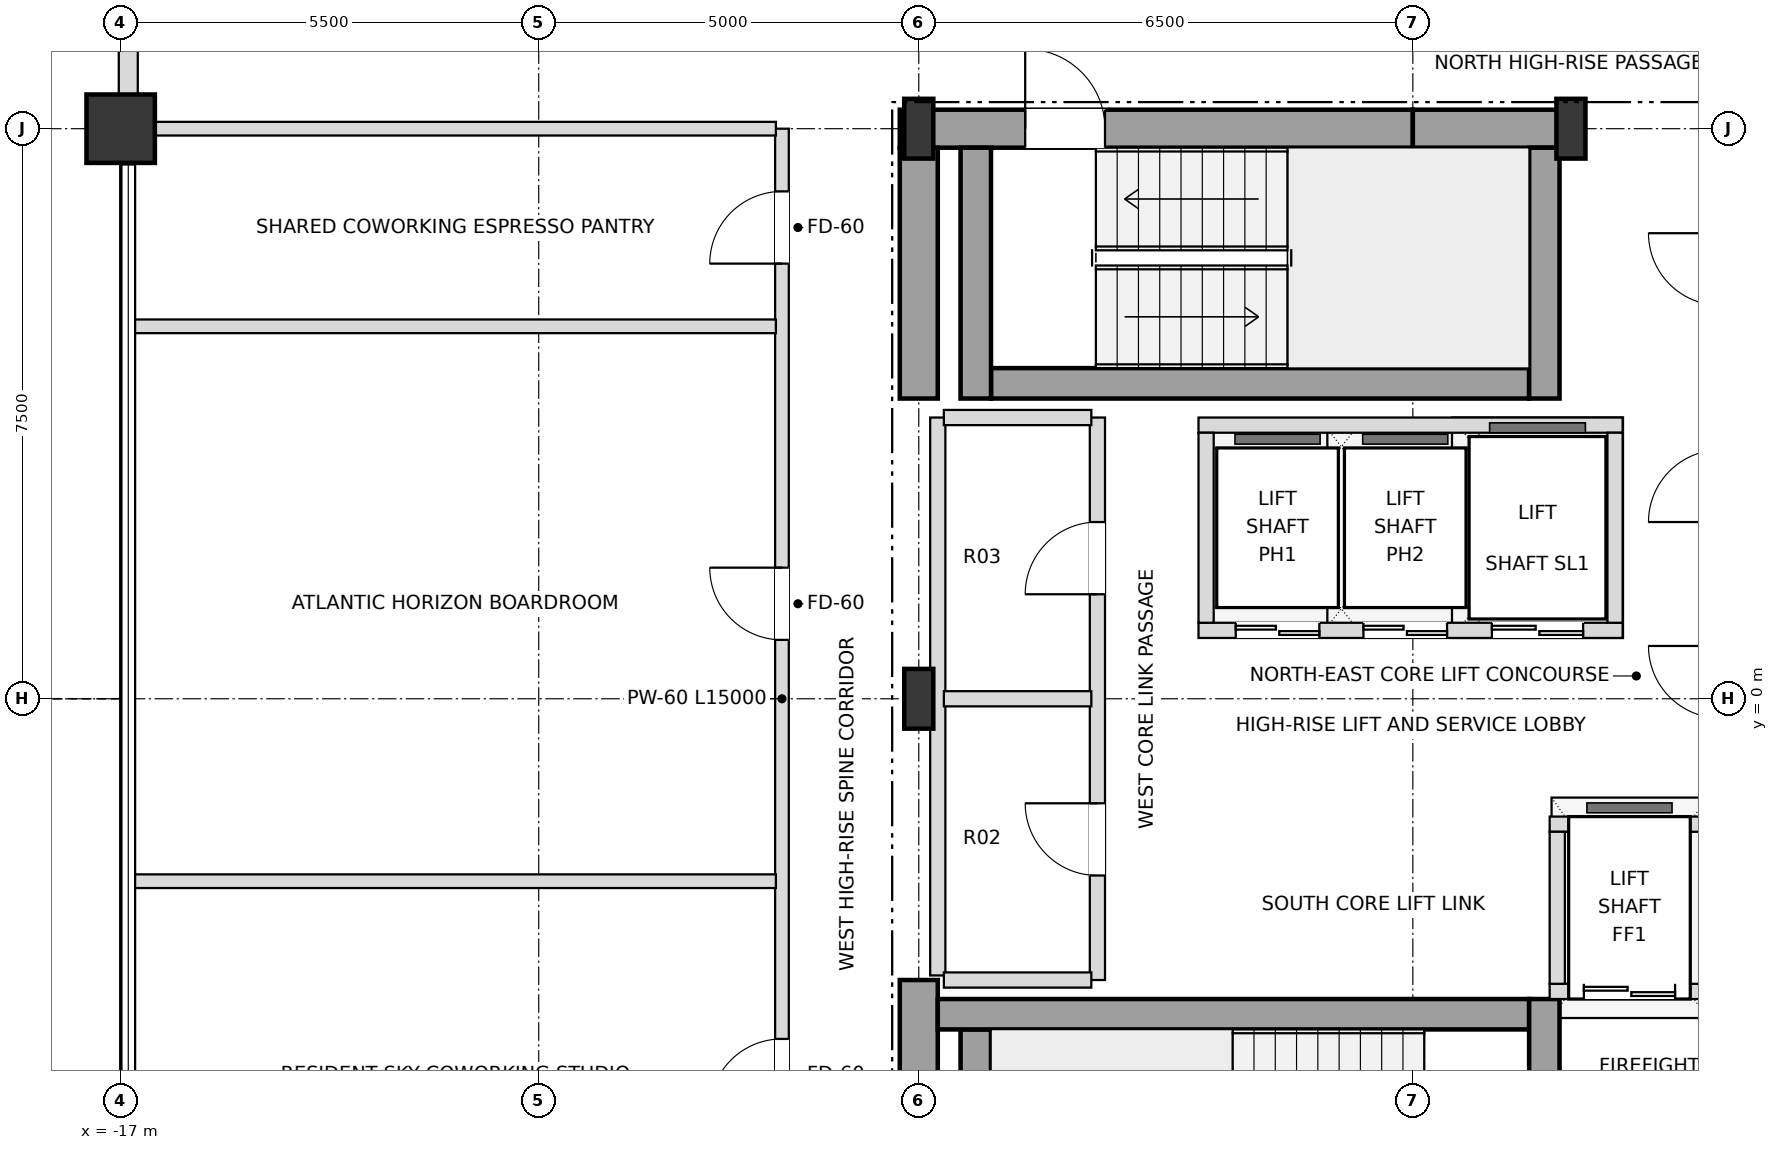
"""IFC4 building model, lengths in metres.
Left out: names, types, materials, properties, quantities, classifications, styles, units other than length and angle.
Written with IfcOpenShell. Run it as: python <this file> out.ifc"""

import sys

from ifc_helpers import new_model, si_unit, direction, frame, frame_2d, origin, origin_2d, place, context, subcontext, project, spatial, rectangle, i_section, extrude, element, fill, save


model = new_model("IFC4")
c1 = context("Model", 3, precision=1e-05, world=origin(), true_north=direction((0.0, 1.0)))
c2 = subcontext(c1, "Body", "Model", "MODEL_VIEW")
j1 = project(units=[si_unit("LENGTHUNIT", "METRE"), si_unit("PLANEANGLEUNIT", "RADIAN")], contexts=[c1])
p1 = place(None, origin())
s1 = spatial("IfcSite", under=j1, at=p1, CompositionType="ELEMENT")
p2 = place(p1, origin())
s2 = spatial("IfcBuilding", under=s1, at=p2, CompositionType="ELEMENT")
p3 = place(p2, frame((0.0, 0.0, 272.7)))
s3 = spatial("IfcBuildingStorey", under=s2, at=p3, CompositionType="ELEMENT", Elevation=272.7)
for number, where, z_axis, x_axis in (
    (1, (-6.5, 0.0, 0.0), (0.0, 0.0, 1.0), (1.0, 0.0, 0.0)),
    (2, (-6.5, 7.5, 0.0), (0.0, 0.0, 1.0), (1.0, 0.0, 0.0)),
    (3, (2.08, 7.5, 0.0), (0.0, 0.0, 1.0), (1.0, 0.0, 0.0)),
):
    element("IfcColumn", number, at=place(p3, frame(where, z_axis=z_axis, x_axis=x_axis)), inside=s3, PredefinedType="COLUMN", context=c2, shape_type="SweptSolid", body=[
        extrude(i_section(OverallWidth=0.382, OverallDepth=0.786, WebThickness=0.02, FlangeThickness=0.033, at=origin_2d()), origin(), (0.0, 0.0, 1.0), 3.6),
    ])
p4 = place(p3, frame((-17.0, 7.5, 0.0), z_axis=(0.0, 0.0, 1.0), x_axis=(1.0, 0.0, 0.0)))
e4 = element("IfcColumn", 4, at=p4, inside=s3, PredefinedType="USERDEFINED", context=c2, shape_type="SweptSolid", body=[
    extrude(rectangle(XDim=0.9, YDim=0.9, at=origin_2d()), origin(), (0.0, 0.0, 1.0), 3.6),
])
p5 = place(p3, frame((-16.9, 12.555, 0.0), z_axis=(0.0, 0.0, 1.0), x_axis=(0.0, -1.0, 0.0)))
e5 = element("IfcWall", 5, at=p5, inside=s3, PredefinedType="SOLIDWALL", context=c2, shape_type="SweptSolid", body=[
    extrude(rectangle(XDim=4.61, YDim=0.25, at=frame_2d((2.305, 0.0))), origin(), (0.0, 0.0, 1.0), 2.748),
])
p6 = place(p5, frame((1.405, 0.0, 0.72)))
e6 = element("IfcOpeningElement", 6, at=p6, cuts=e5, PredefinedType="OPENING", context=c2, shape_type="SweptSolid", body=[
    extrude(rectangle(XDim=1.8, YDim=1.68, at=frame_2d((0.9, 0.84))), frame((0.0, 0.135, 0.0), z_axis=(0.0, -1.0, 0.0), x_axis=(1.0, 0.0, 0.0)), (0.0, 0.0, 1.0), 0.27),
])
p7 = place(p3, frame((-6.75, 7.5, 0.0), z_axis=(0.0, 0.0, 1.0), x_axis=(1.0, 0.0, 0.0)))
e7 = element("IfcWall", 7, at=p7, inside=s3, PredefinedType="SHEAR", context=c2, shape_type="SweptSolid", body=[
    extrude(rectangle(XDim=6.75, YDim=0.5, at=frame_2d((3.375, 0.0))), origin(), (0.0, 0.0, 1.0), 3.38),
])
p8 = place(p7, frame((1.65, 0.0, 0.0)))
e8 = element("IfcOpeningElement", 8, at=p8, cuts=e7, PredefinedType="OPENING", context=c2, shape_type="SweptSolid", body=[
    extrude(rectangle(XDim=1.05, YDim=2.15, at=frame_2d((0.525, 1.075))), frame((0.0, 0.26, 0.0), z_axis=(0.0, -1.0, 0.0), x_axis=(1.0, 0.0, 0.0)), (0.0, 0.0, 1.0), 0.52),
])
p9 = place(p3, frame((0.0, 7.5, 0.0), z_axis=(0.0, 0.0, 1.0), x_axis=(1.0, 0.0, 0.0)))
e9 = element("IfcWall", 9, at=p9, inside=s3, PredefinedType="SHEAR", context=c2, shape_type="SweptSolid", body=[
    extrude(rectangle(XDim=2.08, YDim=0.5, at=frame_2d((1.04, 0.0))), origin(), (0.0, 0.0, 1.0), 3.38),
])
p10 = place(p3, frame((-6.5, -7.25, 0.0), z_axis=(0.0, 0.0, 1.0), x_axis=(0.0, 1.0, 0.0)))
e10 = element("IfcWall", 10, at=p10, inside=s3, PredefinedType="SHEAR", context=c2, shape_type="SweptSolid", body=[
    extrude(rectangle(XDim=3.55, YDim=0.5, at=frame_2d((1.775, 0.0))), origin(), (0.0, 0.0, 1.0), 3.38),
])
p11 = place(p3, frame((-6.5, 3.95, 0.0), z_axis=(0.0, 0.0, 1.0), x_axis=(0.0, 1.0, 0.0)))
e11 = element("IfcWall", 11, at=p11, inside=s3, PredefinedType="SHEAR", context=c2, shape_type="SweptSolid", body=[
    extrude(rectangle(XDim=3.3, YDim=0.5, at=frame_2d((1.65, 0.0))), origin(), (0.0, 0.0, 1.0), 3.38),
])
p12 = place(p3, frame((-5.75, -7.25, 0.0), z_axis=(0.0, 0.0, 1.0), x_axis=(0.0, 1.0, 0.0)))
e12 = element("IfcWall", 12, at=p12, inside=s3, PredefinedType="SHEAR", context=c2, shape_type="SweptSolid", body=[
    extrude(rectangle(XDim=2.9, YDim=0.4, at=frame_2d((1.45, 0.0))), origin(), (0.0, 0.0, 1.0), 3.38),
])
p13 = place(p3, frame((-6.25, -4.15, 0.0), z_axis=(0.0, 0.0, 1.0), x_axis=(1.0, 0.0, 0.0)))
e13 = element("IfcWall", 13, at=p13, inside=s3, PredefinedType="SHEAR", context=c2, shape_type="SweptSolid", body=[
    extrude(rectangle(XDim=7.78, YDim=0.4, at=frame_2d((3.89, 0.0))), origin(), (0.0, 0.0, 1.0), 3.38),
])
p14 = place(p3, frame((1.73, -7.25, 0.0), z_axis=(0.0, 0.0, 1.0), x_axis=(0.0, 1.0, 0.0)))
e14 = element("IfcWall", 14, at=p14, inside=s3, PredefinedType="SHEAR", context=c2, shape_type="SweptSolid", body=[
    extrude(rectangle(XDim=3.3, YDim=0.4, at=frame_2d((1.65, 0.0))), origin(), (0.0, 0.0, 1.0), 3.38),
])
p15 = place(p14, frame((0.9, 0.0, 0.0)))
e15 = element("IfcOpeningElement", 15, at=p15, cuts=e14, PredefinedType="OPENING", context=c2, shape_type="SweptSolid", body=[
    extrude(rectangle(XDim=1.05, YDim=2.15, at=frame_2d((0.525, 1.075))), frame((0.0, 0.21, 0.0), z_axis=(0.0, -1.0, 0.0), x_axis=(1.0, 0.0, 0.0)), (0.0, 0.0, 1.0), 0.42),
])
p16 = place(p3, frame((-5.55, 4.15, 0.0), z_axis=(0.0, 0.0, 1.0), x_axis=(1.0, 0.0, 0.0)))
e16 = element("IfcWall", 16, at=p16, inside=s3, PredefinedType="SHEAR", context=c2, shape_type="SweptSolid", body=[
    extrude(rectangle(XDim=7.08, YDim=0.4, at=frame_2d((3.54, 0.0))), origin(), (0.0, 0.0, 1.0), 3.38),
])
for number, where, z_axis, x_axis in (
    (17, (1.73, 3.95, 0.0), (0.0, 0.0, 1.0), (0.0, 1.0, 0.0)),
    (18, (-5.75, 3.95, 0.0), (0.0, 0.0, 1.0), (0.0, 1.0, 0.0)),
):
    element("IfcWall", number, at=place(p3, frame(where, z_axis=z_axis, x_axis=x_axis)), inside=s3, PredefinedType="SHEAR", context=c2, shape_type="SweptSolid", body=[
        extrude(rectangle(XDim=3.3, YDim=0.4, at=frame_2d((1.65, 0.0))), origin(), (0.0, 0.0, 1.0), 3.38),
    ])
p17 = place(p3, frame((-2.82, 0.9, 0.0), z_axis=(0.0, 0.0, 1.0), x_axis=(1.0, 0.0, 0.0)))
e19 = element("IfcWall", 19, at=p17, inside=s3, PredefinedType="SOLIDWALL", context=c2, shape_type="SweptSolid", body=[
    extrude(rectangle(XDim=5.58, YDim=0.2, at=frame_2d((2.79, 0.0))), origin(), (0.0, 0.0, 1.0), 3.38),
])
p18 = place(p17, frame((0.49, 0.0, 0.0)))
e20 = element("IfcOpeningElement", 20, at=p18, cuts=e19, PredefinedType="OPENING", context=c2, shape_type="SweptSolid", body=[
    extrude(rectangle(XDim=1.1, YDim=2.15, at=frame_2d((0.55, 1.075))), frame((0.0, 0.11, 0.0), z_axis=(0.0, -1.0, 0.0), x_axis=(1.0, 0.0, 0.0)), (0.0, 0.0, 1.0), 0.22),
])
p19 = place(p17, frame((2.17, 0.0, 0.0)))
e21 = element("IfcOpeningElement", 21, at=p19, cuts=e19, PredefinedType="OPENING", context=c2, shape_type="SweptSolid", body=[
    extrude(rectangle(XDim=1.1, YDim=2.15, at=frame_2d((0.55, 1.075))), frame((0.0, 0.11, 0.0), z_axis=(0.0, -1.0, 0.0), x_axis=(1.0, 0.0, 0.0)), (0.0, 0.0, 1.0), 0.22),
])
p20 = place(p17, frame((3.86, 0.0, 0.0)))
e22 = element("IfcOpeningElement", 22, at=p20, cuts=e19, PredefinedType="OPENING", context=c2, shape_type="SweptSolid", body=[
    extrude(rectangle(XDim=1.2, YDim=2.2, at=frame_2d((0.6, 1.1))), frame((0.0, 0.11, 0.0), z_axis=(0.0, -1.0, 0.0), x_axis=(1.0, 0.0, 0.0)), (0.0, 0.0, 1.0), 0.22),
])
p21 = place(p3, frame((-2.82, 3.6, 0.0), z_axis=(0.0, 0.0, 1.0), x_axis=(1.0, 0.0, 0.0)))
e23 = element("IfcWall", 23, at=p21, inside=s3, PredefinedType="SOLIDWALL", context=c2, shape_type="SweptSolid", body=[
    extrude(rectangle(XDim=5.58, YDim=0.2, at=frame_2d((2.79, 0.0))), origin(), (0.0, 0.0, 1.0), 3.38),
])
for number, where, z_axis, x_axis in (
    (24, (-2.72, 1.0, 0.0), (0.0, 0.0, 1.0), (0.0, 1.0, 0.0)),
    (25, (2.66, 1.0, 0.0), (0.0, 0.0, 1.0), (0.0, 1.0, 0.0)),
):
    element("IfcWall", number, at=place(p3, frame(where, z_axis=z_axis, x_axis=x_axis)), inside=s3, PredefinedType="SOLIDWALL", context=c2, shape_type="SweptSolid", body=[
        extrude(rectangle(XDim=2.5, YDim=0.2, at=frame_2d((1.25, 0.0))), origin(), (0.0, 0.0, 1.0), 3.38),
    ])
p22 = place(p3, frame((1.8, -3.85, 0.0), z_axis=(0.0, 0.0, 1.0), x_axis=(1.0, 0.0, 0.0)))
e26 = element("IfcWall", 26, at=p22, inside=s3, PredefinedType="SOLIDWALL", context=c2, shape_type="SweptSolid", body=[
    extrude(rectangle(XDim=4.1, YDim=0.2, at=frame_2d((2.05, 0.0))), origin(), (0.0, 0.0, 1.0), 3.38),
])
p23 = place(p22, frame((0.45, 0.0, 0.0)))
e27 = element("IfcOpeningElement", 27, at=p23, cuts=e26, PredefinedType="OPENING", context=c2, shape_type="SweptSolid", body=[
    extrude(rectangle(XDim=1.2, YDim=2.2, at=frame_2d((0.6, 1.1))), frame((0.0, 0.11, 0.0), z_axis=(0.0, -1.0, 0.0), x_axis=(1.0, 0.0, 0.0)), (0.0, 0.0, 1.0), 0.22),
])
p24 = place(p22, frame((2.45, 0.0, 0.0)))
e28 = element("IfcOpeningElement", 28, at=p24, cuts=e26, PredefinedType="OPENING", context=c2, shape_type="SweptSolid", body=[
    extrude(rectangle(XDim=1.2, YDim=2.2, at=frame_2d((0.6, 1.1))), frame((0.0, 0.11, 0.0), z_axis=(0.0, -1.0, 0.0), x_axis=(1.0, 0.0, 0.0)), (0.0, 0.0, 1.0), 0.22),
])
p25 = place(p3, frame((1.8, -1.65, 0.0), z_axis=(0.0, 0.0, 1.0), x_axis=(1.0, 0.0, 0.0)))
e29 = element("IfcWall", 29, at=p25, inside=s3, PredefinedType="SOLIDWALL", context=c2, shape_type="SweptSolid", body=[
    extrude(rectangle(XDim=4.1, YDim=0.2, at=frame_2d((2.05, 0.0))), origin(), (0.0, 0.0, 1.0), 3.38),
])
p26 = place(p3, frame((1.9, -3.75, 0.0), z_axis=(0.0, 0.0, 1.0), x_axis=(0.0, 1.0, 0.0)))
e30 = element("IfcWall", 30, at=p26, inside=s3, PredefinedType="SOLIDWALL", context=c2, shape_type="SweptSolid", body=[
    extrude(rectangle(XDim=2.0, YDim=0.2, at=frame_2d((1.0, 0.0))), origin(), (0.0, 0.0, 1.0), 3.38),
])
p27 = place(p3, frame((-8.3, -7.5, 0.0), z_axis=(0.0, 0.0, 1.0), x_axis=(0.0, 1.0, 0.0)))
e31 = element("IfcWall", 31, at=p27, inside=s3, PredefinedType="PARTITIONING", context=c2, shape_type="SweptSolid", body=[
    extrude(rectangle(XDim=15.0, YDim=0.18, at=frame_2d((7.5, 0.0))), origin(), (0.0, 0.0, 1.0), 3.38),
])
p28 = place(p27, frame((2.075, 0.0, 0.0)))
e32 = element("IfcOpeningElement", 32, at=p28, cuts=e31, PredefinedType="OPENING", context=c2, shape_type="SweptSolid", body=[
    extrude(rectangle(XDim=0.95, YDim=2.15, at=frame_2d((0.475, 1.075))), frame((0.0, 0.1, 0.0), z_axis=(0.0, -1.0, 0.0), x_axis=(1.0, 0.0, 0.0)), (0.0, 0.0, 1.0), 0.2),
])
p29 = place(p27, frame((8.275, 0.0, 0.0)))
e33 = element("IfcOpeningElement", 33, at=p29, cuts=e31, PredefinedType="OPENING", context=c2, shape_type="SweptSolid", body=[
    extrude(rectangle(XDim=0.95, YDim=2.15, at=frame_2d((0.475, 1.075))), frame((0.0, 0.1, 0.0), z_axis=(0.0, -1.0, 0.0), x_axis=(1.0, 0.0, 0.0)), (0.0, 0.0, 1.0), 0.2),
])
p30 = place(p27, frame((13.225, 0.0, 0.0)))
e34 = element("IfcOpeningElement", 34, at=p30, cuts=e31, PredefinedType="OPENING", context=c2, shape_type="SweptSolid", body=[
    extrude(rectangle(XDim=0.95, YDim=2.15, at=frame_2d((0.475, 1.075))), frame((0.0, 0.1, 0.0), z_axis=(0.0, -1.0, 0.0), x_axis=(1.0, 0.0, 0.0)), (0.0, 0.0, 1.0), 0.2),
])
p31 = place(p3, frame((-6.25, -3.64, 0.0), z_axis=(0.0, 0.0, 1.0), x_axis=(0.0, 1.0, 0.0)))
e35 = element("IfcWall", 35, at=p31, inside=s3, PredefinedType="SOLIDWALL", context=c2, shape_type="SweptSolid", body=[
    extrude(rectangle(XDim=7.34, YDim=0.2, at=frame_2d((3.67, 0.0))), origin(), (0.0, 0.0, 1.0), 3.38),
])
p32 = place(p3, frame((-4.15, -3.7, 0.0), z_axis=(0.0, 0.0, 1.0), x_axis=(0.0, 1.0, 0.0)))
e36 = element("IfcWall", 36, at=p32, inside=s3, PredefinedType="SOLIDWALL", context=c2, shape_type="SweptSolid", body=[
    extrude(rectangle(XDim=7.4, YDim=0.2, at=frame_2d((3.7, 0.0))), origin(), (0.0, 0.0, 1.0), 3.38),
])
p33 = place(p32, frame((1.375, 0.0, 0.0)))
e37 = element("IfcOpeningElement", 37, at=p33, cuts=e36, PredefinedType="OPENING", context=c2, shape_type="SweptSolid", body=[
    extrude(rectangle(XDim=0.95, YDim=2.15, at=frame_2d((0.475, 1.075))), frame((0.0, 0.11, 0.0), z_axis=(0.0, -1.0, 0.0), x_axis=(1.0, 0.0, 0.0)), (0.0, 0.0, 1.0), 0.22),
])
p34 = place(p32, frame((5.075, 0.0, 0.0)))
e38 = element("IfcOpeningElement", 38, at=p34, cuts=e36, PredefinedType="OPENING", context=c2, shape_type="SweptSolid", body=[
    extrude(rectangle(XDim=0.95, YDim=2.15, at=frame_2d((0.475, 1.075))), frame((0.0, 0.11, 0.0), z_axis=(0.0, -1.0, 0.0), x_axis=(1.0, 0.0, 0.0)), (0.0, 0.0, 1.0), 0.22),
])
p35 = place(p3, frame((-6.17, -3.7, 0.0), z_axis=(0.0, 0.0, 1.0), x_axis=(1.0, 0.0, 0.0)))
e39 = element("IfcWall", 39, at=p35, inside=s3, PredefinedType="SOLIDWALL", context=c2, shape_type="SweptSolid", body=[
    extrude(rectangle(XDim=1.94, YDim=0.2, at=frame_2d((0.97, 0.0))), origin(), (0.0, 0.0, 1.0), 3.38),
])
p36 = place(p3, frame((-16.82, -2.4, 0.0), z_axis=(0.0, 0.0, 1.0), x_axis=(1.0, 0.0, 0.0)))
e40 = element("IfcWall", 40, at=p36, inside=s3, PredefinedType="PARTITIONING", context=c2, shape_type="SweptSolid", body=[
    extrude(rectangle(XDim=8.44, YDim=0.18, at=frame_2d((4.22, 0.0))), origin(), (0.0, 0.0, 1.0), 3.018),
])
for number, where, z_axis, x_axis in (
    (41, (-6.17, 0.0, 0.0), (0.0, 0.0, 1.0), (1.0, 0.0, 0.0)),
    (42, (-6.17, 3.7, 0.0), (0.0, 0.0, 1.0), (1.0, 0.0, 0.0)),
):
    element("IfcWall", number, at=place(p3, frame(where, z_axis=z_axis, x_axis=x_axis)), inside=s3, PredefinedType="SOLIDWALL", context=c2, shape_type="SweptSolid", body=[
        extrude(rectangle(XDim=1.94, YDim=0.2, at=frame_2d((0.97, 0.0))), origin(), (0.0, 0.0, 1.0), 3.38),
    ])
p37 = place(p3, frame((-16.82, 4.9, 0.0), z_axis=(0.0, 0.0, 1.0), x_axis=(1.0, 0.0, 0.0)))
e43 = element("IfcWall", 43, at=p37, inside=s3, PredefinedType="PARTITIONING", context=c2, shape_type="SweptSolid", body=[
    extrude(rectangle(XDim=8.44, YDim=0.18, at=frame_2d((4.22, 0.0))), origin(), (0.0, 0.0, 1.0), 3.018),
])
p38 = place(p3, frame((-16.9, 7.5, 0.0), z_axis=(0.0, 0.0, 1.0), x_axis=(1.0, 0.0, 0.0)))
e44 = element("IfcWall", 44, at=p38, inside=s3, PredefinedType="PARTITIONING", context=c2, shape_type="SweptSolid", body=[
    extrude(rectangle(XDim=8.52, YDim=0.18, at=frame_2d((4.26, 0.0))), origin(), (0.0, 0.0, 1.0), 2.826),
])
p39 = place(p8, origin())
e45 = element("IfcDoor", 45, at=p39, inside=s3, OperationType="SINGLE_SWING_LEFT", PredefinedType="DOOR", context=c2, shape_type="SweptSolid", body=[
    extrude(rectangle(XDim=1.05, YDim=2.15, at=frame_2d((0.525, 1.075))), frame((0.0, 0.025, 0.0), z_axis=(0.0, -1.0, 0.0), x_axis=(1.0, 0.0, 0.0)), (0.0, 0.0, 1.0), 0.05),
])
fill(e8, e45)
p40 = place(p18, origin())
e46 = element("IfcDoor", 46, at=p40, inside=s3, OperationType="DOUBLE_DOOR_SLIDING", PredefinedType="DOOR", context=c2, shape_type="SweptSolid", body=[
    extrude(rectangle(XDim=1.1, YDim=2.15, at=frame_2d((0.55, 1.075))), frame((0.0, 0.025, 0.0), z_axis=(0.0, -1.0, 0.0), x_axis=(1.0, 0.0, 0.0)), (0.0, 0.0, 1.0), 0.05),
])
fill(e20, e46)
p41 = place(p19, origin())
e47 = element("IfcDoor", 47, at=p41, inside=s3, OperationType="DOUBLE_DOOR_SLIDING", PredefinedType="DOOR", context=c2, shape_type="SweptSolid", body=[
    extrude(rectangle(XDim=1.1, YDim=2.15, at=frame_2d((0.55, 1.075))), frame((0.0, 0.025, 0.0), z_axis=(0.0, -1.0, 0.0), x_axis=(1.0, 0.0, 0.0)), (0.0, 0.0, 1.0), 0.05),
])
fill(e21, e47)
p42 = place(p20, origin())
e48 = element("IfcDoor", 48, at=p42, inside=s3, OperationType="DOUBLE_DOOR_SLIDING", PredefinedType="DOOR", context=c2, shape_type="SweptSolid", body=[
    extrude(rectangle(XDim=1.2, YDim=2.2, at=frame_2d((0.6, 1.1))), frame((0.0, 0.025, 0.0), z_axis=(0.0, -1.0, 0.0), x_axis=(1.0, 0.0, 0.0)), (0.0, 0.0, 1.0), 0.05),
])
fill(e22, e48)
p43 = place(p23, origin())
e49 = element("IfcDoor", 49, at=p43, inside=s3, OperationType="DOUBLE_DOOR_SLIDING", PredefinedType="DOOR", context=c2, shape_type="SweptSolid", body=[
    extrude(rectangle(XDim=1.2, YDim=2.2, at=frame_2d((0.6, 1.1))), frame((0.0, 0.025, 0.0), z_axis=(0.0, -1.0, 0.0), x_axis=(1.0, 0.0, 0.0)), (0.0, 0.0, 1.0), 0.05),
])
fill(e27, e49)
p44 = place(p33, origin())
e50 = element("IfcDoor", 50, at=p44, inside=s3, OperationType="SINGLE_SWING_RIGHT", PredefinedType="DOOR", context=c2, shape_type="SweptSolid", body=[
    extrude(rectangle(XDim=0.95, YDim=2.15, at=frame_2d((0.475, 1.075))), frame((0.0, 0.025, 0.0), z_axis=(0.0, -1.0, 0.0), x_axis=(1.0, 0.0, 0.0)), (0.0, 0.0, 1.0), 0.05),
])
fill(e37, e50)
p45 = place(p34, origin())
e51 = element("IfcDoor", 51, at=p45, inside=s3, OperationType="SINGLE_SWING_LEFT", PredefinedType="DOOR", context=c2, shape_type="SweptSolid", body=[
    extrude(rectangle(XDim=0.95, YDim=2.15, at=frame_2d((0.475, 1.075))), frame((0.0, 0.025, 0.0), z_axis=(0.0, -1.0, 0.0), x_axis=(1.0, 0.0, 0.0)), (0.0, 0.0, 1.0), 0.05),
])
fill(e38, e51)
p46 = place(p28, origin())
e52 = element("IfcDoor", 52, at=p46, inside=s3, OperationType="SINGLE_SWING_LEFT", PredefinedType="DOOR", context=c2, shape_type="SweptSolid", body=[
    extrude(rectangle(XDim=0.95, YDim=2.15, at=frame_2d((0.475, 1.075))), frame((0.0, 0.025, 0.0), z_axis=(0.0, -1.0, 0.0), x_axis=(1.0, 0.0, 0.0)), (0.0, 0.0, 1.0), 0.05),
])
fill(e32, e52)
p47 = place(p29, origin())
e53 = element("IfcDoor", 53, at=p47, inside=s3, OperationType="SINGLE_SWING_RIGHT", PredefinedType="DOOR", context=c2, shape_type="SweptSolid", body=[
    extrude(rectangle(XDim=0.95, YDim=2.15, at=frame_2d((0.475, 1.075))), frame((0.0, 0.025, 0.0), z_axis=(0.0, -1.0, 0.0), x_axis=(1.0, 0.0, 0.0)), (0.0, 0.0, 1.0), 0.05),
])
fill(e33, e53)
p48 = place(p30, origin())
e54 = element("IfcDoor", 54, at=p48, inside=s3, OperationType="SINGLE_SWING_LEFT", PredefinedType="DOOR", context=c2, shape_type="SweptSolid", body=[
    extrude(rectangle(XDim=0.95, YDim=2.15, at=frame_2d((0.475, 1.075))), frame((0.0, 0.025, 0.0), z_axis=(0.0, -1.0, 0.0), x_axis=(1.0, 0.0, 0.0)), (0.0, 0.0, 1.0), 0.05),
])
fill(e34, e54)
save(model, sys.argv[1])
